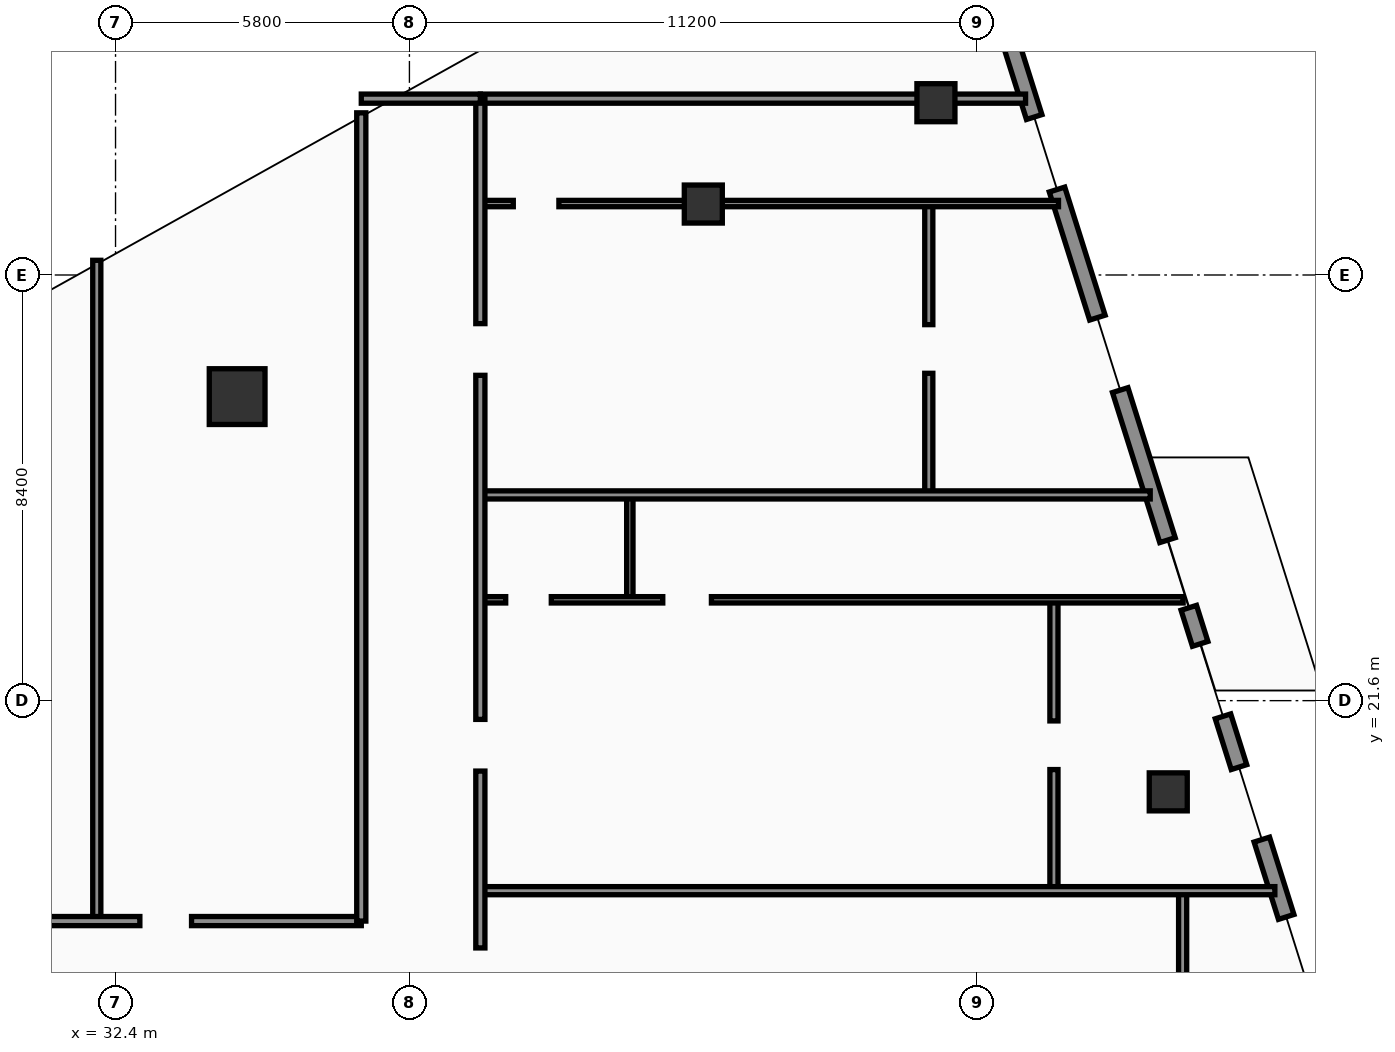
"""IFC4 building model, lengths in metres.
Left out: names, types, materials, properties, quantities, classifications, styles, units other than length and angle.
Written with IfcOpenShell. Run it as: python <this file> out.ifc"""

import sys

from ifc_helpers import new_model, si_unit, direction, frame, frame_2d, origin, origin_2d, place, context, subcontext, project, spatial, rectangle, hollow_rectangle, circle, extrude, element, fill, save


model = new_model("IFC4")
c1 = context("Model", 3, precision=1e-05, world=origin(), true_north=direction((0.0, 1.0)))
c2 = subcontext(c1, "Body", "Model", "MODEL_VIEW")
j1 = project(units=[si_unit("LENGTHUNIT", "METRE"), si_unit("PLANEANGLEUNIT", "RADIAN")], contexts=[c1])
p1 = place(None, origin())
s1 = spatial("IfcSite", under=j1, at=p1, CompositionType="ELEMENT")
p2 = place(p1, origin())
s2 = spatial("IfcBuilding", under=s1, at=p2, CompositionType="ELEMENT")
p3 = place(p2, frame((0.0, 0.0, 116.4)))
s3 = spatial("IfcBuildingStorey", under=s2, at=p3, CompositionType="ELEMENT", Elevation=116.4)
p4 = place(p3, frame((34.8, 27.6, 0.0), z_axis=(0.0, 0.0, 1.0), x_axis=(1.0, 0.0, 0.0)))
e1 = element("IfcColumn", 1, at=p4, inside=s3, PredefinedType="COLUMN", context=c2, shape_type="SweptSolid", body=[
    extrude(circle(Radius=0.55, at=origin_2d()), origin(), (0.0, 0.0, 1.0), 3.56),
])
for number, where, z_axis, x_axis in (
    (2, (44.0, 31.4, 0.0), (0.0, 0.0, 1.0), (1.0, 0.0, 0.0)),
    (3, (53.176, 19.8, 0.0), (0.0, 0.0, 1.0), (1.0, 0.0, 0.0)),
    (4, (48.591, 33.4, 0.0), (0.0, 0.0, 1.0), (1.0, 0.0, 0.0)),
):
    element("IfcColumn", number, at=place(p3, frame(where, z_axis=z_axis, x_axis=x_axis)), inside=s3, PredefinedType="COLUMN", context=c2, shape_type="SweptSolid", body=[
        extrude(hollow_rectangle(XDim=0.75, YDim=0.75, WallThickness=0.032, at=origin_2d()), origin(), (0.0, 0.0, 1.0), 3.56),
    ])
p5 = place(p3, frame((59.23, 5.505, 0.0), z_axis=(0.0, 0.0, 1.0), x_axis=(-0.300509063924, 0.953778958931, 0.0)))
e5 = element("IfcWall", 5, at=p5, inside=s3, PredefinedType="SOLIDWALL", context=c2, shape_type="SweptSolid", body=[
    extrude(rectangle(XDim=30.814, YDim=0.32, at=frame_2d((15.407, 0.0))), origin(), (0.0, 0.0, 1.0), 3.56),
])
p6 = place(p5, frame((18.796, 0.0, 0.0)))
e6 = element("IfcOpeningElement", 6, at=p6, cuts=e5, PredefinedType="OPENING", context=c2, shape_type="SweptSolid", body=[
    extrude(rectangle(XDim=1.4, YDim=2.25, at=frame_2d((0.7, 1.125))), frame((0.0, 0.17, 0.0), z_axis=(0.0, -1.0, 0.0), x_axis=(1.0, 0.0, 0.0)), (0.0, 0.0, 1.0), 0.34),
])
p7 = place(p5, frame((2.65, 0.0, 0.75)))
e7 = element("IfcOpeningElement", 7, at=p7, cuts=e5, PredefinedType="OPENING", context=c2, shape_type="SweptSolid", body=[
    extrude(rectangle(XDim=1.5, YDim=1.6, at=frame_2d((0.75, 0.8))), frame((0.0, 0.17, 0.0), z_axis=(0.0, -1.0, 0.0), x_axis=(1.0, 0.0, 0.0)), (0.0, 0.0, 1.0), 0.34),
])
p8 = place(p5, frame((4.7, 0.0, 0.75)))
e8 = element("IfcOpeningElement", 8, at=p8, cuts=e5, PredefinedType="OPENING", context=c2, shape_type="SweptSolid", body=[
    extrude(rectangle(XDim=1.5, YDim=1.6, at=frame_2d((0.75, 0.8))), frame((0.0, 0.17, 0.0), z_axis=(0.0, -1.0, 0.0), x_axis=(1.0, 0.0, 0.0)), (0.0, 0.0, 1.0), 0.34),
])
p9 = place(p5, frame((7.8, 0.0, 0.75)))
e9 = element("IfcOpeningElement", 9, at=p9, cuts=e5, PredefinedType="OPENING", context=c2, shape_type="SweptSolid", body=[
    extrude(rectangle(XDim=1.5, YDim=1.6, at=frame_2d((0.75, 0.8))), frame((0.0, 0.17, 0.0), z_axis=(0.0, -1.0, 0.0), x_axis=(1.0, 0.0, 0.0)), (0.0, 0.0, 1.0), 0.34),
])
p10 = place(p5, frame((10.9, 0.0, 0.75)))
e10 = element("IfcOpeningElement", 10, at=p10, cuts=e5, PredefinedType="OPENING", context=c2, shape_type="SweptSolid", body=[
    extrude(rectangle(XDim=1.5, YDim=1.6, at=frame_2d((0.75, 0.8))), frame((0.0, 0.17, 0.0), z_axis=(0.0, -1.0, 0.0), x_axis=(1.0, 0.0, 0.0)), (0.0, 0.0, 1.0), 0.34),
])
p11 = place(p5, frame((14.0, 0.0, 0.75)))
e11 = element("IfcOpeningElement", 11, at=p11, cuts=e5, PredefinedType="OPENING", context=c2, shape_type="SweptSolid", body=[
    extrude(rectangle(XDim=1.5, YDim=1.6, at=frame_2d((0.75, 0.8))), frame((0.0, 0.17, 0.0), z_axis=(0.0, -1.0, 0.0), x_axis=(1.0, 0.0, 0.0)), (0.0, 0.0, 1.0), 0.34),
])
p12 = place(p5, frame((16.55, 0.0, 0.75)))
e12 = element("IfcOpeningElement", 12, at=p12, cuts=e5, PredefinedType="OPENING", context=c2, shape_type="SweptSolid", body=[
    extrude(rectangle(XDim=1.5, YDim=1.6, at=frame_2d((0.75, 0.8))), frame((0.0, 0.17, 0.0), z_axis=(0.0, -1.0, 0.0), x_axis=(1.0, 0.0, 0.0)), (0.0, 0.0, 1.0), 0.34),
])
p13 = place(p5, frame((23.3, 0.0, 0.75)))
e13 = element("IfcOpeningElement", 13, at=p13, cuts=e5, PredefinedType="OPENING", context=c2, shape_type="SweptSolid", body=[
    extrude(rectangle(XDim=1.5, YDim=1.6, at=frame_2d((0.75, 0.8))), frame((0.0, 0.17, 0.0), z_axis=(0.0, -1.0, 0.0), x_axis=(1.0, 0.0, 0.0)), (0.0, 0.0, 1.0), 0.34),
])
p14 = place(p5, frame((27.45, 0.0, 0.75)))
e14 = element("IfcOpeningElement", 14, at=p14, cuts=e5, PredefinedType="OPENING", context=c2, shape_type="SweptSolid", body=[
    extrude(rectangle(XDim=1.5, YDim=1.6, at=frame_2d((0.75, 0.8))), frame((0.0, 0.17, 0.0), z_axis=(0.0, -1.0, 0.0), x_axis=(1.0, 0.0, 0.0)), (0.0, 0.0, 1.0), 0.34),
])
p15 = place(p3, frame((32.03, 17.25, 0.0), z_axis=(0.0, 0.0, 1.0), x_axis=(0.0, 1.0, 0.0)))
e15 = element("IfcWall", 15, at=p15, inside=s3, PredefinedType="PARTITIONING", context=c2, shape_type="SweptSolid", body=[
    extrude(rectangle(XDim=13.04, YDim=0.16, at=frame_2d((6.52, 0.0))), origin(), (0.0, 0.0, 1.0), 2.84),
])
p16 = place(p3, frame((21.5, 17.25, 0.0), z_axis=(0.0, 0.0, 1.0), x_axis=(1.0, 0.0, 0.0)))
e16 = element("IfcWall", 16, at=p16, inside=s3, PredefinedType="PARTITIONING", context=c2, shape_type="SweptSolid", body=[
    extrude(rectangle(XDim=15.75, YDim=0.18, at=frame_2d((7.875, 0.0))), origin(), (0.0, 0.0, 1.0), 2.84),
])
p17 = place(p16, frame((0.95, 0.0, 0.0)))
e17 = element("IfcOpeningElement", 17, at=p17, cuts=e16, PredefinedType="OPENING", context=c2, shape_type="SweptSolid", body=[
    extrude(rectangle(XDim=1.02, YDim=2.2, at=frame_2d((0.51, 1.1))), frame((0.0, 0.1, 0.0), z_axis=(0.0, -1.0, 0.0), x_axis=(1.0, 0.0, 0.0)), (0.0, 0.0, 1.0), 0.2),
])
p18 = place(p16, frame((6.82, 0.0, 0.0)))
e18 = element("IfcOpeningElement", 18, at=p18, cuts=e16, PredefinedType="OPENING", context=c2, shape_type="SweptSolid", body=[
    extrude(rectangle(XDim=1.02, YDim=2.2, at=frame_2d((0.51, 1.1))), frame((0.0, 0.1, 0.0), z_axis=(0.0, -1.0, 0.0), x_axis=(1.0, 0.0, 0.0)), (0.0, 0.0, 1.0), 0.2),
])
p19 = place(p16, frame((11.38, 0.0, 0.0)))
e19 = element("IfcOpeningElement", 19, at=p19, cuts=e16, PredefinedType="OPENING", context=c2, shape_type="SweptSolid", body=[
    extrude(rectangle(XDim=1.02, YDim=2.2, at=frame_2d((0.51, 1.1))), frame((0.0, 0.1, 0.0), z_axis=(0.0, -1.0, 0.0), x_axis=(1.0, 0.0, 0.0)), (0.0, 0.0, 1.0), 0.2),
])
p20 = place(p3, frame((37.25, 17.25, 0.0), z_axis=(0.0, 0.0, 1.0), x_axis=(0.0, 1.0, 0.0)))
e20 = element("IfcWall", 20, at=p20, inside=s3, PredefinedType="PARTITIONING", context=c2, shape_type="SweptSolid", body=[
    extrude(rectangle(XDim=15.95, YDim=0.18, at=frame_2d((7.975, 0.0))), origin(), (0.0, 0.0, 1.0), 2.84),
])
p21 = place(p3, frame((53.46, 7.45, 0.0), z_axis=(0.0, 0.0, 1.0), x_axis=(0.0, 1.0, 0.0)))
e21 = element("IfcWall", 21, at=p21, inside=s3, PredefinedType="PARTITIONING", context=c2, shape_type="SweptSolid", body=[
    extrude(rectangle(XDim=10.4, YDim=0.16, at=frame_2d((5.2, 0.0))), origin(), (0.0, 0.0, 1.0), 3.04),
])
p22 = place(p21, frame((4.72, 0.0, 0.0)))
e22 = element("IfcOpeningElement", 22, at=p22, cuts=e21, PredefinedType="OPENING", context=c2, shape_type="SweptSolid", body=[
    extrude(rectangle(XDim=0.96, YDim=2.2, at=frame_2d((0.48, 1.1))), frame((0.0, 0.09, 0.0), z_axis=(0.0, -1.0, 0.0), x_axis=(1.0, 0.0, 0.0)), (0.0, 0.0, 1.0), 0.18),
])
p23 = place(p3, frame((42.55, 23.59, 0.0), z_axis=(0.0, 0.0, 1.0), x_axis=(0.0, 1.0, 0.0)))
e23 = element("IfcWall", 23, at=p23, inside=s3, PredefinedType="PARTITIONING", context=c2, shape_type="SweptSolid", body=[
    extrude(rectangle(XDim=2.07, YDim=0.125, at=frame_2d((1.035, 0.0))), origin(), (0.0, 0.0, 1.0), 3.19),
])
p24 = place(p3, frame((50.92, 17.85, 0.0), z_axis=(0.0, 0.0, 1.0), x_axis=(0.0, 1.0, 0.0)))
e24 = element("IfcWall", 24, at=p24, inside=s3, PredefinedType="PARTITIONING", context=c2, shape_type="SweptSolid", body=[
    extrude(rectangle(XDim=5.74, YDim=0.16, at=frame_2d((2.87, 0.0))), origin(), (0.0, 0.0, 1.0), 2.84),
])
p25 = place(p24, frame((2.39, 0.0, 0.0)))
e25 = element("IfcOpeningElement", 25, at=p25, cuts=e24, PredefinedType="OPENING", context=c2, shape_type="SweptSolid", body=[
    extrude(rectangle(XDim=0.96, YDim=2.2, at=frame_2d((0.48, 1.1))), frame((0.0, 0.09, 0.0), z_axis=(0.0, -1.0, 0.0), x_axis=(1.0, 0.0, 0.0)), (0.0, 0.0, 1.0), 0.18),
])
p26 = place(p3, frame((39.6, 23.59, 0.0), z_axis=(0.0, 0.0, 1.0), x_axis=(1.0, 0.0, 0.0)))
e26 = element("IfcWall", 26, at=p26, inside=s3, PredefinedType="PARTITIONING", context=c2, shape_type="SweptSolid", body=[
    extrude(rectangle(XDim=13.87, YDim=0.125, at=frame_2d((6.935, 0.0))), origin(), (0.0, 0.0, 1.0), 2.84),
])
p27 = place(p26, frame((0.5, 0.0, 0.0)))
e27 = element("IfcOpeningElement", 27, at=p27, cuts=e26, PredefinedType="OPENING", context=c2, shape_type="SweptSolid", body=[
    extrude(rectangle(XDim=0.9, YDim=2.15, at=frame_2d((0.45, 1.075))), frame((0.0, 0.073, 0.0), z_axis=(0.0, -1.0, 0.0), x_axis=(1.0, 0.0, 0.0)), (0.0, 0.0, 1.0), 0.145),
])
p28 = place(p26, frame((3.6, 0.0, 0.0)))
e28 = element("IfcOpeningElement", 28, at=p28, cuts=e26, PredefinedType="OPENING", context=c2, shape_type="SweptSolid", body=[
    extrude(rectangle(XDim=0.96, YDim=2.2, at=frame_2d((0.48, 1.1))), frame((0.0, 0.073, 0.0), z_axis=(0.0, -1.0, 0.0), x_axis=(1.0, 0.0, 0.0)), (0.0, 0.0, 1.0), 0.145),
])
p29 = place(p3, frame((48.45, 25.66, 0.0), z_axis=(0.0, 0.0, 1.0), x_axis=(0.0, 1.0, 0.0)))
e29 = element("IfcWall", 29, at=p29, inside=s3, PredefinedType="PARTITIONING", context=c2, shape_type="SweptSolid", body=[
    extrude(rectangle(XDim=5.75, YDim=0.16, at=frame_2d((2.875, 0.0))), origin(), (0.0, 0.0, 1.0), 3.56),
])
p30 = place(p29, frame((2.4, 0.0, 0.0)))
e30 = element("IfcOpeningElement", 30, at=p30, cuts=e29, PredefinedType="OPENING", context=c2, shape_type="SweptSolid", body=[
    extrude(rectangle(XDim=0.96, YDim=2.2, at=frame_2d((0.48, 1.1))), frame((0.0, 0.09, 0.0), z_axis=(0.0, -1.0, 0.0), x_axis=(1.0, 0.0, 0.0)), (0.0, 0.0, 1.0), 0.18),
])
p31 = place(p3, frame((39.6, 31.41, 0.0), z_axis=(0.0, 0.0, 1.0), x_axis=(1.0, 0.0, 0.0)))
e31 = element("IfcWall", 31, at=p31, inside=s3, PredefinedType="PARTITIONING", context=c2, shape_type="SweptSolid", body=[
    extrude(rectangle(XDim=11.41, YDim=0.125, at=frame_2d((5.705, 0.0))), origin(), (0.0, 0.0, 1.0), 2.84),
])
p32 = place(p31, frame((0.65, 0.0, 0.0)))
e32 = element("IfcOpeningElement", 32, at=p32, cuts=e31, PredefinedType="OPENING", context=c2, shape_type="SweptSolid", body=[
    extrude(rectangle(XDim=0.9, YDim=2.15, at=frame_2d((0.45, 1.075))), frame((0.0, 0.073, 0.0), z_axis=(0.0, -1.0, 0.0), x_axis=(1.0, 0.0, 0.0)), (0.0, 0.0, 1.0), 0.145),
])
p33 = place(p3, frame((39.6, 25.66, 0.0), z_axis=(0.0, 0.0, 1.0), x_axis=(1.0, 0.0, 0.0)))
e33 = element("IfcWall", 33, at=p33, inside=s3, PredefinedType="PARTITIONING", context=c2, shape_type="SweptSolid", body=[
    extrude(rectangle(XDim=13.22, YDim=0.16, at=frame_2d((6.61, 0.0))), origin(), (0.0, 0.0, 1.0), 2.84),
])
p34 = place(p3, frame((39.6, 17.85, 0.0), z_axis=(0.0, 0.0, 1.0), x_axis=(1.0, 0.0, 0.0)))
e34 = element("IfcWall", 34, at=p34, inside=s3, PredefinedType="PARTITIONING", context=c2, shape_type="SweptSolid", body=[
    extrude(rectangle(XDim=15.68, YDim=0.16, at=frame_2d((7.84, 0.0))), origin(), (0.0, 0.0, 1.0), 2.84),
])
p35 = place(p3, frame((39.6, 33.48, 0.0), z_axis=(0.0, 0.0, 1.0), x_axis=(1.0, 0.0, 0.0)))
e35 = element("IfcWall", 35, at=p35, inside=s3, PredefinedType="PARTITIONING", context=c2, shape_type="SweptSolid", body=[
    extrude(rectangle(XDim=10.76, YDim=0.18, at=frame_2d((5.38, 0.0))), origin(), (0.0, 0.0, 1.0), 2.84),
])
p36 = place(p3, frame((39.6, 2.44, 0.0), z_axis=(0.0, 0.0, 1.0), x_axis=(0.0, 1.0, 0.0)))
e36 = element("IfcWall", 36, at=p36, inside=s3, PredefinedType="PARTITIONING", context=c2, shape_type="SweptSolid", body=[
    extrude(rectangle(XDim=31.04, YDim=0.18, at=frame_2d((15.52, 0.0))), origin(), (0.0, 0.0, 1.0), 2.84),
])
p37 = place(p36, frame((13.26, 0.0, 0.0)))
e37 = element("IfcOpeningElement", 37, at=p37, cuts=e36, PredefinedType="OPENING", context=c2, shape_type="SweptSolid", body=[
    extrude(rectangle(XDim=1.02, YDim=2.2, at=frame_2d((0.51, 1.1))), frame((0.0, 0.1, 0.0), z_axis=(0.0, -1.0, 0.0), x_axis=(1.0, 0.0, 0.0)), (0.0, 0.0, 1.0), 0.2),
])
p38 = place(p36, frame((17.77, 0.0, 0.0)))
e38 = element("IfcOpeningElement", 38, at=p38, cuts=e36, PredefinedType="OPENING", context=c2, shape_type="SweptSolid", body=[
    extrude(rectangle(XDim=1.02, YDim=2.2, at=frame_2d((0.51, 1.1))), frame((0.0, 0.1, 0.0), z_axis=(0.0, -1.0, 0.0), x_axis=(1.0, 0.0, 0.0)), (0.0, 0.0, 1.0), 0.2),
])
p39 = place(p36, frame((25.58, 0.0, 0.0)))
e39 = element("IfcOpeningElement", 39, at=p39, cuts=e36, PredefinedType="OPENING", context=c2, shape_type="SweptSolid", body=[
    extrude(rectangle(XDim=1.02, YDim=2.2, at=frame_2d((0.51, 1.1))), frame((0.0, 0.1, 0.0), z_axis=(0.0, -1.0, 0.0), x_axis=(1.0, 0.0, 0.0)), (0.0, 0.0, 1.0), 0.2),
])
p40 = place(p3, frame((37.25, 33.48, 0.0), z_axis=(0.0, 0.0, 1.0), x_axis=(1.0, 0.0, 0.0)))
e40 = element("IfcWall", 40, at=p40, inside=s3, PredefinedType="PARTITIONING", context=c2, shape_type="SweptSolid", body=[
    extrude(rectangle(XDim=2.35, YDim=0.18, at=frame_2d((1.175, 0.0))), origin(), (0.0, 0.0, 1.0), 3.56),
])
p41 = place(p6, origin())
e41 = element("IfcDoor", 41, at=p41, inside=s3, OperationType="SINGLE_SWING_LEFT", PredefinedType="DOOR", context=c2, shape_type="SweptSolid", body=[
    extrude(rectangle(XDim=1.4, YDim=2.25, at=frame_2d((0.7, 1.125))), frame((0.0, 0.025, 0.0), z_axis=(0.0, -1.0, 0.0), x_axis=(1.0, 0.0, 0.0)), (0.0, 0.0, 1.0), 0.05),
])
fill(e6, e41)
p42 = place(p10, origin())
e42 = element("IfcWindow", 42, at=p42, inside=s3, PartitioningType="SINGLE_PANEL", PredefinedType="WINDOW", context=c2, shape_type="SweptSolid", body=[
    extrude(rectangle(XDim=1.5, YDim=1.6, at=frame_2d((0.75, 0.8))), frame((0.0, 0.03, 0.0), z_axis=(0.0, -1.0, 0.0), x_axis=(1.0, 0.0, 0.0)), (0.0, 0.0, 1.0), 0.06),
])
fill(e10, e42)
p43 = place(p11, origin())
e43 = element("IfcWindow", 43, at=p43, inside=s3, PartitioningType="SINGLE_PANEL", PredefinedType="WINDOW", context=c2, shape_type="SweptSolid", body=[
    extrude(rectangle(XDim=1.5, YDim=1.6, at=frame_2d((0.75, 0.8))), frame((0.0, 0.03, 0.0), z_axis=(0.0, -1.0, 0.0), x_axis=(1.0, 0.0, 0.0)), (0.0, 0.0, 1.0), 0.06),
])
fill(e11, e43)
p44 = place(p12, origin())
e44 = element("IfcWindow", 44, at=p44, inside=s3, PartitioningType="SINGLE_PANEL", PredefinedType="WINDOW", context=c2, shape_type="SweptSolid", body=[
    extrude(rectangle(XDim=1.5, YDim=1.6, at=frame_2d((0.75, 0.8))), frame((0.0, 0.03, 0.0), z_axis=(0.0, -1.0, 0.0), x_axis=(1.0, 0.0, 0.0)), (0.0, 0.0, 1.0), 0.06),
])
fill(e12, e44)
p45 = place(p13, origin())
e45 = element("IfcWindow", 45, at=p45, inside=s3, PartitioningType="SINGLE_PANEL", PredefinedType="WINDOW", context=c2, shape_type="SweptSolid", body=[
    extrude(rectangle(XDim=1.5, YDim=1.6, at=frame_2d((0.75, 0.8))), frame((0.0, 0.03, 0.0), z_axis=(0.0, -1.0, 0.0), x_axis=(1.0, 0.0, 0.0)), (0.0, 0.0, 1.0), 0.06),
])
fill(e13, e45)
p46 = place(p14, origin())
e46 = element("IfcWindow", 46, at=p46, inside=s3, PartitioningType="SINGLE_PANEL", PredefinedType="WINDOW", context=c2, shape_type="SweptSolid", body=[
    extrude(rectangle(XDim=1.5, YDim=1.6, at=frame_2d((0.75, 0.8))), frame((0.0, 0.03, 0.0), z_axis=(0.0, -1.0, 0.0), x_axis=(1.0, 0.0, 0.0)), (0.0, 0.0, 1.0), 0.06),
])
fill(e14, e46)
p47 = place(p19, origin())
e47 = element("IfcDoor", 47, at=p47, inside=s3, OperationType="SINGLE_SWING_RIGHT", PredefinedType="DOOR", context=c2, shape_type="SweptSolid", body=[
    extrude(rectangle(XDim=1.02, YDim=2.2, at=frame_2d((0.51, 1.1))), frame((0.0, 0.025, 0.0), z_axis=(0.0, -1.0, 0.0), x_axis=(1.0, 0.0, 0.0)), (0.0, 0.0, 1.0), 0.05),
])
fill(e19, e47)
p48 = place(p25, origin())
e48 = element("IfcDoor", 48, at=p48, inside=s3, OperationType="SINGLE_SWING_LEFT", PredefinedType="DOOR", context=c2, shape_type="SweptSolid", body=[
    extrude(rectangle(XDim=0.96, YDim=2.2, at=frame_2d((0.48, 1.1))), frame((0.0, 0.025, 0.0), z_axis=(0.0, -1.0, 0.0), x_axis=(1.0, 0.0, 0.0)), (0.0, 0.0, 1.0), 0.05),
])
fill(e25, e48)
p49 = place(p27, origin())
e49 = element("IfcDoor", 49, at=p49, inside=s3, OperationType="SINGLE_SWING_LEFT", PredefinedType="DOOR", context=c2, shape_type="SweptSolid", body=[
    extrude(rectangle(XDim=0.9, YDim=2.15, at=frame_2d((0.45, 1.075))), frame((0.0, 0.025, 0.0), z_axis=(0.0, -1.0, 0.0), x_axis=(1.0, 0.0, 0.0)), (0.0, 0.0, 1.0), 0.05),
])
fill(e27, e49)
p50 = place(p28, origin())
e50 = element("IfcDoor", 50, at=p50, inside=s3, OperationType="SINGLE_SWING_RIGHT", PredefinedType="DOOR", context=c2, shape_type="SweptSolid", body=[
    extrude(rectangle(XDim=0.96, YDim=2.2, at=frame_2d((0.48, 1.1))), frame((0.0, 0.025, 0.0), z_axis=(0.0, -1.0, 0.0), x_axis=(1.0, 0.0, 0.0)), (0.0, 0.0, 1.0), 0.05),
])
fill(e28, e50)
p51 = place(p30, origin())
e51 = element("IfcDoor", 51, at=p51, inside=s3, OperationType="SINGLE_SWING_LEFT", PredefinedType="DOOR", context=c2, shape_type="SweptSolid", body=[
    extrude(rectangle(XDim=0.96, YDim=2.2, at=frame_2d((0.48, 1.1))), frame((0.0, 0.025, 0.0), z_axis=(0.0, -1.0, 0.0), x_axis=(1.0, 0.0, 0.0)), (0.0, 0.0, 1.0), 0.05),
])
fill(e30, e51)
p52 = place(p32, origin())
e52 = element("IfcDoor", 52, at=p52, inside=s3, OperationType="SINGLE_SWING_LEFT", PredefinedType="DOOR", context=c2, shape_type="SweptSolid", body=[
    extrude(rectangle(XDim=0.9, YDim=2.15, at=frame_2d((0.45, 1.075))), frame((0.0, 0.025, 0.0), z_axis=(0.0, -1.0, 0.0), x_axis=(1.0, 0.0, 0.0)), (0.0, 0.0, 1.0), 0.05),
])
fill(e32, e52)
p53 = place(p37, origin())
e53 = element("IfcDoor", 53, at=p53, inside=s3, OperationType="SINGLE_SWING_LEFT", PredefinedType="DOOR", context=c2, shape_type="SweptSolid", body=[
    extrude(rectangle(XDim=1.02, YDim=2.2, at=frame_2d((0.51, 1.1))), frame((0.0, 0.025, 0.0), z_axis=(0.0, -1.0, 0.0), x_axis=(1.0, 0.0, 0.0)), (0.0, 0.0, 1.0), 0.05),
])
fill(e37, e53)
p54 = place(p38, origin())
e54 = element("IfcDoor", 54, at=p54, inside=s3, OperationType="SINGLE_SWING_RIGHT", PredefinedType="DOOR", context=c2, shape_type="SweptSolid", body=[
    extrude(rectangle(XDim=1.02, YDim=2.2, at=frame_2d((0.51, 1.1))), frame((0.0, 0.025, 0.0), z_axis=(0.0, -1.0, 0.0), x_axis=(1.0, 0.0, 0.0)), (0.0, 0.0, 1.0), 0.05),
])
fill(e38, e54)
p55 = place(p39, origin())
e55 = element("IfcDoor", 55, at=p55, inside=s3, OperationType="SINGLE_SWING_LEFT", PredefinedType="DOOR", context=c2, shape_type="SweptSolid", body=[
    extrude(rectangle(XDim=1.02, YDim=2.2, at=frame_2d((0.51, 1.1))), frame((0.0, 0.025, 0.0), z_axis=(0.0, -1.0, 0.0), x_axis=(1.0, 0.0, 0.0)), (0.0, 0.0, 1.0), 0.05),
])
fill(e39, e55)
save(model, sys.argv[1])
